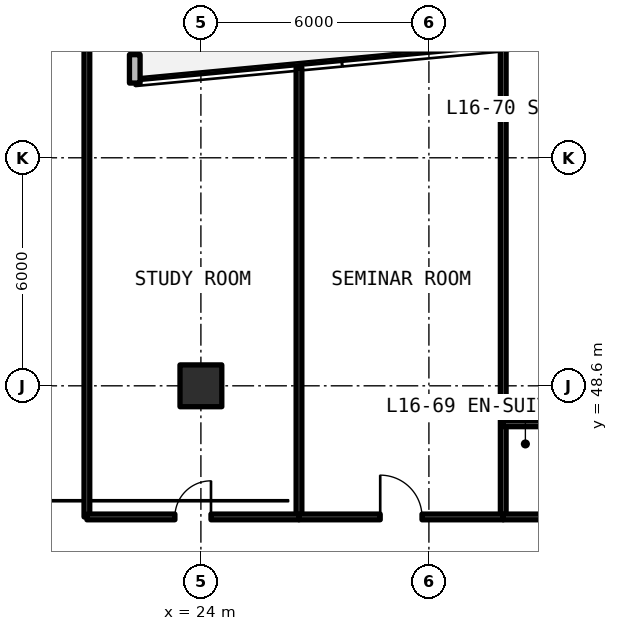
"""IFC4 building model, lengths in metres.
Left out: names, types, materials, properties, quantities, classifications, styles, units other than length and angle.
Written with IfcOpenShell. Run it as: python <this file> out.ifc"""

import sys

from ifc_helpers import new_model, si_unit, direction, frame, frame_2d, origin, origin_2d, place, context, subcontext, project, spatial, rectangle, extrude, element, fill, save


model = new_model("IFC4")
c1 = context("Model", 3, precision=1e-05, world=origin(), true_north=direction((0.0, 1.0)))
c2 = subcontext(c1, "Body", "Model", "MODEL_VIEW")
j1 = project(units=[si_unit("LENGTHUNIT", "METRE"), si_unit("PLANEANGLEUNIT", "RADIAN")], contexts=[c1])
p1 = place(None, origin())
s1 = spatial("IfcSite", under=j1, at=p1, CompositionType="ELEMENT")
p2 = place(p1, origin())
s2 = spatial("IfcBuilding", under=s1, at=p2, CompositionType="ELEMENT")
p3 = place(p2, frame((0.0, 0.0, 58.74)))
s3 = spatial("IfcBuildingStorey", under=s2, at=p3, CompositionType="ELEMENT", Elevation=58.74)
p4 = place(p3, frame((24.0, 48.6, 0.0), z_axis=(0.0, 0.0, 1.0), x_axis=(1.0, 0.0, 0.0)))
e1 = element("IfcColumn", 1, at=p4, inside=s3, PredefinedType="COLUMN", context=c2, shape_type="SweptSolid", body=[
    extrude(rectangle(XDim=1.1, YDim=1.1, at=origin_2d()), origin(), (0.0, 0.0, 1.0), 3.63),
])
p5 = place(p3, frame((22.26, 56.566, 0.0), z_axis=(0.0, 0.0, 1.0), x_axis=(0.0, 1.0, 0.0)))
e2 = element("IfcWall", 2, at=p5, inside=s3, PredefinedType="SOLIDWALL", context=c2, shape_type="SweptSolid", body=[
    extrude(rectangle(XDim=2.894, YDim=0.28, at=frame_2d((1.447, 0.0))), origin(), (0.0, 0.0, 1.0), 3.41),
])
p6 = place(p5, frame((0.747, 0.0, 0.78)))
e3 = element("IfcOpeningElement", 3, at=p6, cuts=e2, PredefinedType="OPENING", context=c2, shape_type="SweptSolid", body=[
    extrude(rectangle(XDim=1.4, YDim=1.65, at=frame_2d((0.7, 0.825))), frame((0.0, 0.15, 0.0), z_axis=(0.0, -1.0, 0.0), x_axis=(1.0, 0.0, 0.0)), (0.0, 0.0, 1.0), 0.3),
])
p7 = place(p3, frame((20.858, 59.46, 0.0), z_axis=(0.0, 0.0, 1.0), x_axis=(-0.707106781187, -0.707106781187, 0.0)))
e4 = element("IfcWall", 4, at=p7, inside=s3, PredefinedType="SOLIDWALL", context=c2, shape_type="SweptSolid", body=[
    extrude(rectangle(XDim=5.824, YDim=0.28, at=frame_2d((2.912, 0.0))), origin(), (0.0, 0.0, 1.0), 3.41),
])
p8 = place(p7, frame((1.212, 0.0, 0.78)))
e5 = element("IfcOpeningElement", 5, at=p8, cuts=e4, PredefinedType="OPENING", context=c2, shape_type="SweptSolid", body=[
    extrude(rectangle(XDim=3.4, YDim=1.66, at=frame_2d((1.7, 0.83))), frame((0.0, 0.15, 0.0), z_axis=(0.0, -1.0, 0.0), x_axis=(1.0, 0.0, 0.0)), (0.0, 0.0, 1.0), 0.3),
])
p9 = place(p3, frame((21.0, 45.15, 0.0), z_axis=(0.0, 0.0, 1.0), x_axis=(0.0, 1.0, 0.0)))
e6 = element("IfcWall", 6, at=p9, inside=s3, PredefinedType="SOLIDWALL", context=c2, shape_type="SweptSolid", body=[
    extrude(rectangle(XDim=14.31, YDim=0.15, at=frame_2d((7.155, 0.0))), origin(), (0.0, 0.0, 1.0), 2.63),
])
p10 = place(p3, frame((26.581, 45.15, 0.0), z_axis=(0.0, 0.0, 1.0), x_axis=(0.0, 1.0, 0.0)))
e7 = element("IfcWall", 7, at=p10, inside=s3, PredefinedType="SOLIDWALL", context=c2, shape_type="SweptSolid", body=[
    extrude(rectangle(XDim=11.824, YDim=0.15, at=frame_2d((5.912, 0.0))), origin(), (0.0, 0.0, 1.0), 2.63),
])
p11 = place(p3, frame((21.0, 45.15, 0.0), z_axis=(0.0, 0.0, 1.0), x_axis=(1.0, 0.0, 0.0)))
e8 = element("IfcWall", 8, at=p11, inside=s3, PredefinedType="SOLIDWALL", context=c2, shape_type="SweptSolid", body=[
    extrude(rectangle(XDim=5.581, YDim=0.15, at=frame_2d((2.791, 0.0))), origin(), (0.0, 0.0, 1.0), 2.63),
])
p12 = place(p11, frame((2.316, 0.0, 0.0)))
e9 = element("IfcOpeningElement", 9, at=p12, cuts=e8, PredefinedType="OPENING", context=c2, shape_type="SweptSolid", body=[
    extrude(rectangle(XDim=0.95, YDim=2.15, at=frame_2d((0.475, 1.075))), frame((0.0, 0.085, 0.0), z_axis=(0.0, -1.0, 0.0), x_axis=(1.0, 0.0, 0.0)), (0.0, 0.0, 1.0), 0.17),
])
p13 = place(p3, frame((31.956, 45.15, 0.0), z_axis=(0.0, 0.0, 1.0), x_axis=(0.0, 1.0, 0.0)))
e10 = element("IfcWall", 10, at=p13, inside=s3, PredefinedType="SOLIDWALL", context=c2, shape_type="SweptSolid", body=[
    extrude(rectangle(XDim=12.331, YDim=0.15, at=frame_2d((6.166, 0.0))), origin(), (0.0, 0.0, 1.0), 2.63),
])
p14 = place(p3, frame((26.581, 45.15, 0.0), z_axis=(0.0, 0.0, 1.0), x_axis=(1.0, 0.0, 0.0)))
e11 = element("IfcWall", 11, at=p14, inside=s3, PredefinedType="SOLIDWALL", context=c2, shape_type="SweptSolid", body=[
    extrude(rectangle(XDim=5.375, YDim=0.15, at=frame_2d((2.687, 0.0))), origin(), (0.0, 0.0, 1.0), 2.63),
])
p15 = place(p14, frame((2.137, 0.0, 0.0)))
e12 = element("IfcOpeningElement", 12, at=p15, cuts=e11, PredefinedType="OPENING", context=c2, shape_type="SweptSolid", body=[
    extrude(rectangle(XDim=1.1, YDim=2.15, at=frame_2d((0.55, 1.075))), frame((0.0, 0.085, 0.0), z_axis=(0.0, -1.0, 0.0), x_axis=(1.0, 0.0, 0.0)), (0.0, 0.0, 1.0), 0.17),
])
p16 = place(p3, frame((31.956, 47.6, 0.0), z_axis=(0.0, 0.0, 1.0), x_axis=(1.0, 0.0, 0.0)))
e13 = element("IfcWall", 13, at=p16, inside=s3, PredefinedType="PARTITIONING", context=c2, shape_type="SweptSolid", body=[
    extrude(rectangle(XDim=2.161, YDim=0.15, at=frame_2d((1.081, 0.0))), origin(), (0.0, 0.0, 1.0), 2.63),
])
p17 = place(p3, frame((31.956, 45.15, 0.0), z_axis=(0.0, 0.0, 1.0), x_axis=(1.0, 0.0, 0.0)))
e14 = element("IfcWall", 14, at=p17, inside=s3, PredefinedType="SOLIDWALL", context=c2, shape_type="SweptSolid", body=[
    extrude(rectangle(XDim=6.356, YDim=0.15, at=frame_2d((3.178, 0.0))), origin(), (0.0, 0.0, 1.0), 2.63),
])
p18 = place(p17, frame((3.824, 0.0, 0.0)))
e15 = element("IfcOpeningElement", 15, at=p18, cuts=e14, PredefinedType="OPENING", context=c2, shape_type="SweptSolid", body=[
    extrude(rectangle(XDim=0.95, YDim=2.15, at=frame_2d((0.475, 1.075))), frame((0.0, 0.085, 0.0), z_axis=(0.0, -1.0, 0.0), x_axis=(1.0, 0.0, 0.0)), (0.0, 0.0, 1.0), 0.17),
])
p19 = place(p6, origin())
e16 = element("IfcWindow", 16, at=p19, inside=s3, PartitioningType="SINGLE_PANEL", PredefinedType="WINDOW", context=c2, shape_type="SweptSolid", body=[
    extrude(rectangle(XDim=1.4, YDim=1.65, at=frame_2d((0.7, 0.825))), frame((0.0, 0.03, 0.0), z_axis=(0.0, -1.0, 0.0), x_axis=(1.0, 0.0, 0.0)), (0.0, 0.0, 1.0), 0.06),
])
fill(e3, e16)
p20 = place(p12, origin())
e17 = element("IfcDoor", 17, at=p20, inside=s3, OperationType="SINGLE_SWING_RIGHT", PredefinedType="DOOR", context=c2, shape_type="SweptSolid", body=[
    extrude(rectangle(XDim=0.95, YDim=2.15, at=frame_2d((0.475, 1.075))), frame((0.0, 0.025, 0.0), z_axis=(0.0, -1.0, 0.0), x_axis=(1.0, 0.0, 0.0)), (0.0, 0.0, 1.0), 0.05),
])
fill(e9, e17)
p21 = place(p15, origin())
e18 = element("IfcDoor", 18, at=p21, inside=s3, OperationType="SINGLE_SWING_LEFT", PredefinedType="DOOR", context=c2, shape_type="SweptSolid", body=[
    extrude(rectangle(XDim=1.1, YDim=2.15, at=frame_2d((0.55, 1.075))), frame((0.0, 0.025, 0.0), z_axis=(0.0, -1.0, 0.0), x_axis=(1.0, 0.0, 0.0)), (0.0, 0.0, 1.0), 0.05),
])
fill(e12, e18)
save(model, sys.argv[1])
